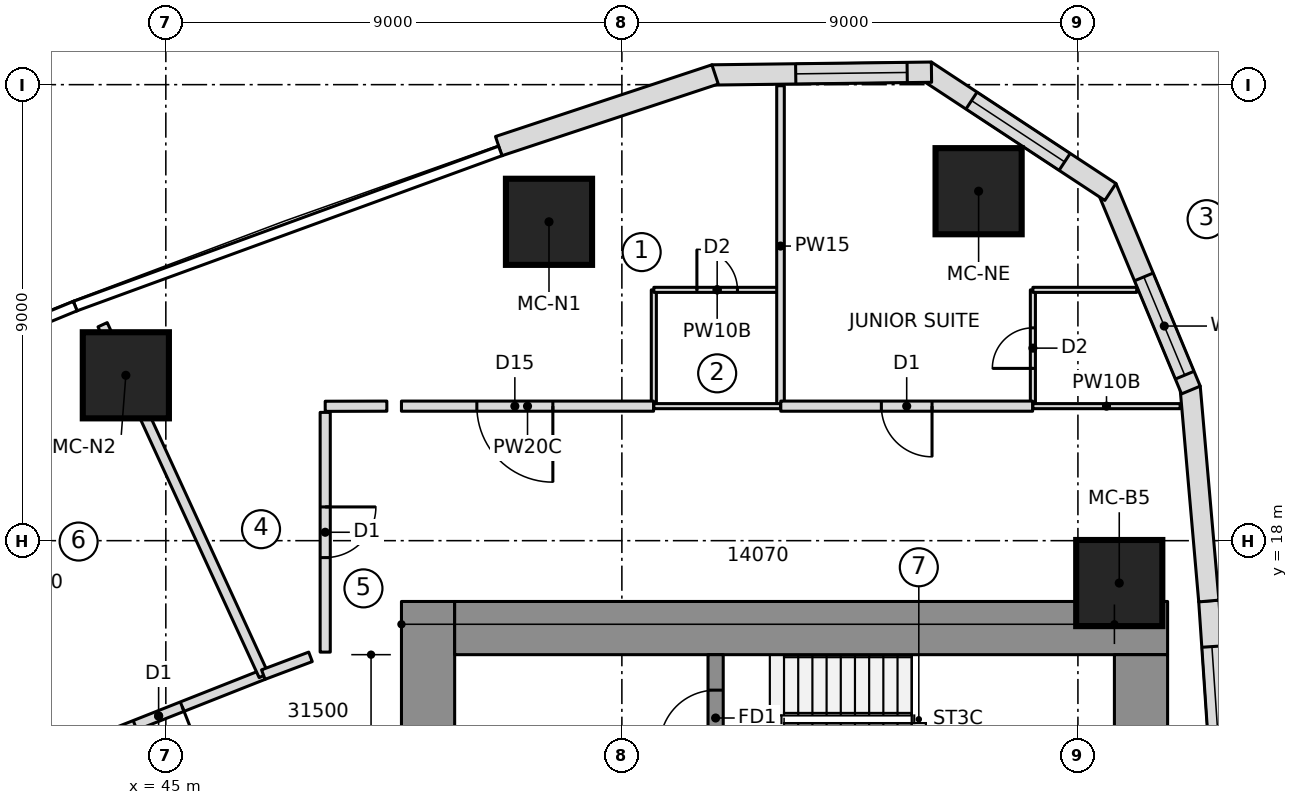
"""IFC4 building model, lengths in metres.
Left out: names, types, materials, properties, quantities, classifications, styles, units other than length and angle.
Written with IfcOpenShell. Run it as: python <this file> out.ifc"""

import sys

from ifc_helpers import new_model, si_unit, direction, frame, frame_2d, origin, origin_2d, place, context, subcontext, project, spatial, polyline, rectangle, outline, extrude, element, fill, save


model = new_model("IFC4")
c1 = context("Model", 3, precision=1e-05, world=origin(), true_north=direction((0.0, 1.0)))
c2 = subcontext(c1, "Body", "Model", "MODEL_VIEW")
j1 = project(units=[si_unit("LENGTHUNIT", "METRE"), si_unit("PLANEANGLEUNIT", "RADIAN")], contexts=[c1])
p1 = place(None, origin())
s1 = spatial("IfcSite", under=j1, at=p1, CompositionType="ELEMENT")
p2 = place(p1, origin())
s2 = spatial("IfcBuilding", under=s1, at=p2, CompositionType="ELEMENT")
p3 = place(p2, frame((0.0, 0.0, 88.45)))
s3 = spatial("IfcBuildingStorey", under=s2, at=p3, CompositionType="ELEMENT", Elevation=88.45)
p4 = place(p3, frame((50.175, 6.65, 0.0), z_axis=(0.0, 0.0, 1.0), x_axis=(0.0, 1.0, 0.0)))
e1 = element("IfcWall", 1, at=p4, inside=s3, PredefinedType="SHEAR", context=c2, shape_type="SweptSolid", body=[
    extrude(rectangle(XDim=10.15, YDim=1.05, at=frame_2d((5.075, 0.0))), origin(), (0.0, 0.0, 1.0), 3.55),
])
p5 = place(p4, frame((6.5, 0.0, 0.0)))
e2 = element("IfcOpeningElement", 2, at=p5, cuts=e1, PredefinedType="OPENING", context=c2, shape_type="SweptSolid", body=[
    extrude(rectangle(XDim=1.1, YDim=2.1, at=frame_2d((0.55, 1.05))), frame((0.0, 0.535, 0.0), z_axis=(0.0, -1.0, 0.0), x_axis=(1.0, 0.0, 0.0)), (0.0, 0.0, 1.0), 1.07),
])
p6 = place(p3, frame((50.7, 16.275, 0.0), z_axis=(0.0, 0.0, 1.0), x_axis=(1.0, 0.0, 0.0)))
e3 = element("IfcWall", 3, at=p6, inside=s3, PredefinedType="SHEAR", context=c2, shape_type="SweptSolid", body=[
    extrude(rectangle(XDim=14.07, YDim=1.05, at=frame_2d((7.035, 0.0))), origin(), (0.0, 0.0, 1.0), 3.55),
])
p7 = place(p3, frame((64.245, 9.389, 0.0), z_axis=(0.0, 0.0, 1.0), x_axis=(0.0, 1.0, 0.0)))
e4 = element("IfcWall", 4, at=p7, inside=s3, PredefinedType="SHEAR", context=c2, shape_type="SweptSolid", body=[
    extrude(rectangle(XDim=6.361, YDim=1.05, at=frame_2d((3.181, 0.0))), origin(), (0.0, 0.0, 1.0), 3.55),
])
p8 = place(p3, frame((55.85, 10.35, 0.0), z_axis=(0.0, 0.0, 1.0), x_axis=(0.0, 1.0, 0.0)))
e5 = element("IfcWall", 5, at=p8, inside=s3, PredefinedType="SHEAR", context=c2, shape_type="SweptSolid", body=[
    extrude(rectangle(XDim=5.4, YDim=0.3, at=frame_2d((2.7, 0.0))), origin(), (0.0, 0.0, 1.0), 3.55),
])
p9 = place(p8, frame((1.43, 0.0, 0.0)))
e6 = element("IfcOpeningElement", 6, at=p9, cuts=e5, PredefinedType="OPENING", context=c2, shape_type="SweptSolid", body=[
    extrude(rectangle(XDim=1.1, YDim=2.1, at=frame_2d((0.55, 1.05))), frame((0.0, 0.16, 0.0), z_axis=(0.0, -1.0, 0.0), x_axis=(1.0, 0.0, 0.0)), (0.0, 0.0, 1.0), 0.32),
])
p10 = place(p8, frame((3.6, 0.0, 0.0)))
e7 = element("IfcOpeningElement", 7, at=p10, cuts=e5, PredefinedType="OPENING", context=c2, shape_type="SweptSolid", body=[
    extrude(rectangle(XDim=1.1, YDim=2.1, at=frame_2d((0.55, 1.05))), frame((0.0, 0.16, 0.0), z_axis=(0.0, -1.0, 0.0), x_axis=(1.0, 0.0, 0.0)), (0.0, 0.0, 1.0), 0.32),
])
for number, where, z_axis, x_axis in (
    (8, (63.816, 17.164, 0.0), (0.0, 0.0, 1.0), (1.0, 0.0, 0.0)),
    (9, (61.04, 24.897, 0.0), (0.0, 0.0, 1.0), (1.0, 0.0, 0.0)),
    (10, (52.562, 24.293, 0.0), (0.0, 0.0, 1.0), (1.0, 0.0, 0.0)),
    (11, (44.211, 21.264, 0.0), (0.0, 0.0, 1.0), (1.0, 0.0, 0.0)),
):
    element("IfcColumn", number, at=place(p3, frame(where, z_axis=z_axis, x_axis=x_axis)), inside=s3, PredefinedType="COLUMN", context=c2, shape_type="SweptSolid", body=[
        extrude(rectangle(XDim=1.7, YDim=1.7, at=origin_2d()), origin(), (0.0, 0.0, 1.0), 3.55),
    ])
p11 = place(p3, frame((65.868, 12.614, 0.0), z_axis=(0.0, 0.0, 1.0), x_axis=(-0.067724559895, 0.997704056315, 0.0)))
e12 = element("IfcWall", 12, at=p11, inside=s3, PredefinedType="NOTDEFINED", context=c2, shape_type="SweptSolid", body=[
    extrude(outline(polyline([(-0.002, -0.2), (4.209, -0.2), (4.205, 0.2), (0.002, 0.2), (-0.002, -0.2)])), origin(), (0.0, 0.0, 1.0), 3.25),
])
p12 = place(p11, frame((0.903, 0.0, 0.5)))
e13 = element("IfcOpeningElement", 13, at=p12, cuts=e12, PredefinedType="OPENING", context=c2, shape_type="SweptSolid", body=[
    extrude(rectangle(XDim=2.4, YDim=2.0, at=frame_2d((1.2, 1.0))), frame((0.0, 0.21, 0.0), z_axis=(0.0, -1.0, 0.0), x_axis=(1.0, 0.0, 0.0)), (0.0, 0.0, 1.0), 0.42),
])
p13 = place(p3, frame((65.583, 16.811, 0.0), z_axis=(0.0, 0.0, 1.0), x_axis=(-0.086992730434, 0.996208946382, 0.0)))
e14 = element("IfcWall", 14, at=p13, inside=s3, PredefinedType="NOTDEFINED", context=c2, shape_type="SweptSolid", body=[
    extrude(outline(polyline([(-0.002, -0.2), (4.238, -0.2), (4.176, 0.2), (0.002, 0.2), (-0.002, -0.2)])), origin(), (0.0, 0.0, 1.0), 3.25),
])
p14 = place(p3, frame((65.217, 21.002, 0.0), z_axis=(0.0, 0.0, 1.0), x_axis=(-0.383997751971, 0.923334027577, 0.0)))
e15 = element("IfcWall", 15, at=p14, inside=s3, PredefinedType="NOTDEFINED", context=c2, shape_type="SweptSolid", body=[
    extrude(outline(polyline([(-0.031, -0.2), (4.3, -0.2), (4.177, 0.2), (0.031, 0.2), (-0.031, -0.2)])), origin(), (0.0, 0.0, 1.0), 3.25),
])
p15 = place(p14, frame((0.287, 0.0, 0.6)))
e16 = element("IfcOpeningElement", 16, at=p15, cuts=e15, PredefinedType="OPENING", context=c2, shape_type="SweptSolid", body=[
    extrude(outline(polyline([(0.0, 1.4), (0.08, 1.802), (0.308, 2.142), (0.648, 2.37), (1.05, 2.45), (1.452, 2.37), (1.792, 2.142), (2.02, 1.802), (2.1, 1.4), (2.1, 1.05), (2.02, 0.648), (1.792, 0.308), (1.452, 0.08), (1.05, 0.0), (0.648, 0.08), (0.308, 0.308), (0.08, 0.648), (0.0, 1.05), (0.0, 1.4)])), frame((0.0, 0.21, 0.0), z_axis=(0.0, -1.0, 0.0), x_axis=(1.0, 0.0, 0.0)), (0.0, 0.0, 1.0), 0.42),
])
p16 = place(p3, frame((63.59, 24.916, 0.0), z_axis=(0.0, 0.0, 1.0), x_axis=(-0.835340523653, 0.549732852887, 0.0)))
e17 = element("IfcWall", 17, at=p16, inside=s3, PredefinedType="NOTDEFINED", context=c2, shape_type="SweptSolid", body=[
    extrude(outline(polyline([(-0.061, -0.2), (4.3, -0.2), (4.178, 0.2), (0.061, 0.2), (-0.061, -0.2)])), origin(), (0.0, 0.0, 1.0), 3.25),
])
p17 = place(p16, frame((1.02, 0.0, 0.6)))
e18 = element("IfcOpeningElement", 18, at=p17, cuts=e17, PredefinedType="OPENING", context=c2, shape_type="SweptSolid", body=[
    extrude(outline(polyline([(0.0, 1.35), (0.084, 1.771), (0.322, 2.128), (0.679, 2.366), (1.1, 2.45), (1.521, 2.366), (1.878, 2.128), (2.116, 1.771), (2.2, 1.35), (2.2, 1.1), (2.116, 0.679), (1.878, 0.322), (1.521, 0.084), (1.1, 0.0), (0.679, 0.084), (0.322, 0.322), (0.084, 0.679), (0.0, 1.1), (0.0, 1.35)])), frame((0.0, 0.21, 0.0), z_axis=(0.0, -1.0, 0.0), x_axis=(1.0, 0.0, 0.0)), (0.0, 0.0, 1.0), 0.42),
])
p18 = place(p3, frame((60.049, 27.246, 0.0), z_axis=(0.0, 0.0, 1.0), x_axis=(-0.999919718849, -0.012671063772, 0.0)))
e19 = element("IfcWall", 19, at=p18, inside=s3, PredefinedType="NOTDEFINED", context=c2, shape_type="SweptSolid", body=[
    extrude(outline(polyline([(-0.061, -0.2), (4.27, -0.2), (4.208, 0.2), (0.061, 0.2), (-0.061, -0.2)])), origin(), (0.0, 0.0, 1.0), 3.25),
])
p19 = place(p18, frame((0.418, 0.0, 0.6)))
e20 = element("IfcOpeningElement", 20, at=p19, cuts=e19, PredefinedType="OPENING", context=c2, shape_type="SweptSolid", body=[
    extrude(outline(polyline([(0.0, 1.35), (0.084, 1.771), (0.322, 2.128), (0.679, 2.366), (1.1, 2.45), (1.521, 2.366), (1.878, 2.128), (2.116, 1.771), (2.2, 1.35), (2.2, 1.1), (2.116, 0.679), (1.878, 0.322), (1.521, 0.084), (1.1, 0.0), (0.679, 0.084), (0.322, 0.322), (0.084, 0.679), (0.0, 1.1), (0.0, 1.35)])), frame((0.0, 0.21, 0.0), z_axis=(0.0, -1.0, 0.0), x_axis=(1.0, 0.0, 0.0)), (0.0, 0.0, 1.0), 0.42),
])
p20 = place(p3, frame((55.81, 27.192, 0.0), z_axis=(0.0, 0.0, 1.0), x_axis=(-0.94925004851, -0.314522408429, 0.0)))
e21 = element("IfcWall", 21, at=p20, inside=s3, PredefinedType="NOTDEFINED", context=c2, shape_type="SweptSolid", body=[
    extrude(outline(polyline([(-0.031, -0.2), (4.468, -0.2), (4.468, 0.2), (0.031, 0.2), (-0.031, -0.2)])), origin(), (0.0, 0.0, 1.0), 3.25),
])
p21 = place(p3, frame((54.631, 20.65, 0.0), z_axis=(0.0, 0.0, 1.0), x_axis=(0.0, 1.0, 0.0)))
e22 = element("IfcWall", 22, at=p21, inside=s3, PredefinedType="PARTITIONING", context=c2, shape_type="SweptSolid", body=[
    extrude(rectangle(XDim=2.3, YDim=0.1, at=frame_2d((1.15, 0.0))), origin(), (0.0, 0.0, 1.0), 3.25),
])
p22 = place(p3, frame((54.631, 22.95, 0.0), z_axis=(0.0, 0.0, 1.0), x_axis=(1.0, 0.0, 0.0)))
e23 = element("IfcWall", 23, at=p22, inside=s3, PredefinedType="PARTITIONING", context=c2, shape_type="SweptSolid", body=[
    extrude(rectangle(XDim=2.5, YDim=0.1, at=frame_2d((1.25, 0.0))), origin(), (0.0, 0.0, 1.0), 3.25),
])
p23 = place(p22, frame((0.85, 0.0, 0.0)))
e24 = element("IfcOpeningElement", 24, at=p23, cuts=e23, PredefinedType="OPENING", context=c2, shape_type="SweptSolid", body=[
    extrude(rectangle(XDim=0.8, YDim=2.1, at=frame_2d((0.4, 1.05))), frame((0.0, 0.06, 0.0), z_axis=(0.0, -1.0, 0.0), x_axis=(1.0, 0.0, 0.0)), (0.0, 0.0, 1.0), 0.12),
])
p24 = place(p3, frame((62.111, 20.65, 0.0), z_axis=(0.0, 0.0, 1.0), x_axis=(0.0, 1.0, 0.0)))
e25 = element("IfcWall", 25, at=p24, inside=s3, PredefinedType="PARTITIONING", context=c2, shape_type="SweptSolid", body=[
    extrude(rectangle(XDim=2.3, YDim=0.1, at=frame_2d((1.15, 0.0))), origin(), (0.0, 0.0, 1.0), 3.25),
])
p25 = place(p24, frame((0.75, 0.0, 0.0)))
e26 = element("IfcOpeningElement", 26, at=p25, cuts=e25, PredefinedType="OPENING", context=c2, shape_type="SweptSolid", body=[
    extrude(rectangle(XDim=0.8, YDim=2.1, at=frame_2d((0.4, 1.05))), frame((0.0, 0.06, 0.0), z_axis=(0.0, -1.0, 0.0), x_axis=(1.0, 0.0, 0.0)), (0.0, 0.0, 1.0), 0.12),
])
p26 = place(p3, frame((62.111, 22.95, 0.0), z_axis=(0.0, 0.0, 1.0), x_axis=(1.0, 0.0, 0.0)))
e27 = element("IfcWall", 27, at=p26, inside=s3, PredefinedType="PARTITIONING", context=c2, shape_type="SweptSolid", body=[
    extrude(rectangle(XDim=2.049, YDim=0.1, at=frame_2d((1.025, 0.0))), origin(), (0.0, 0.0, 1.0), 3.25),
])
p27 = place(p3, frame((57.131, 20.65, 0.0), z_axis=(0.0, 0.0, 1.0), x_axis=(0.0, 1.0, 0.0)))
e28 = element("IfcWall", 28, at=p27, inside=s3, PredefinedType="PARTITIONING", context=c2, shape_type="SweptSolid", body=[
    extrude(rectangle(XDim=6.329, YDim=0.15, at=frame_2d((3.165, 0.0))), origin(), (0.0, 0.0, 1.0), 3.25),
])
p28 = place(p3, frame((42.799, 13.705, 0.0), z_axis=(0.0, 0.0, 1.0), x_axis=(-0.417427858403, 0.908710065438, 0.0)))
e29 = element("IfcWall", 29, at=p28, inside=s3, PredefinedType="PARTITIONING", context=c2, shape_type="SweptSolid", body=[
    extrude(rectangle(XDim=7.61, YDim=0.2, at=frame_2d((3.805, 0.0))), origin(), (0.0, 0.0, 1.0), 3.25),
])
p29 = place(p3, frame((46.924, 15.357, 0.0), z_axis=(0.0, 0.0, 1.0), x_axis=(-0.930040633249, -0.367456692014, 0.0)))
e30 = element("IfcWall", 30, at=p29, inside=s3, PredefinedType="PARTITIONING", context=c2, shape_type="SweptSolid", body=[
    extrude(rectangle(XDim=4.444, YDim=0.2, at=frame_2d((2.222, 0.0))), origin(), (0.0, 0.0, 1.0), 3.25),
])
p30 = place(p29, frame((1.722, 0.0, 0.0)))
e31 = element("IfcOpeningElement", 31, at=p30, cuts=e30, PredefinedType="OPENING", context=c2, shape_type="SweptSolid", body=[
    extrude(rectangle(XDim=1.0, YDim=2.1, at=frame_2d((0.5, 1.05))), frame((0.0, 0.11, 0.0), z_axis=(0.0, -1.0, 0.0), x_axis=(1.0, 0.0, 0.0)), (0.0, 0.0, 1.0), 0.22),
])
p31 = place(p3, frame((46.933, 15.339, 0.0), z_axis=(0.0, 0.0, 1.0), x_axis=(-0.417437957167, 0.908705426371, 0.0)))
e32 = element("IfcWall", 32, at=p31, inside=s3, PredefinedType="PARTITIONING", context=c2, shape_type="SweptSolid", body=[
    extrude(rectangle(XDim=7.619, YDim=0.2, at=frame_2d((3.81, 0.0))), origin(), (0.0, 0.0, 1.0), 3.25),
])
p32 = place(p3, frame((54.625, 20.655, 0.0), z_axis=(0.0, 0.0, 1.0), x_axis=(-1.0, 0.0, 0.0)))
e33 = element("IfcWall", 33, at=p32, inside=s3, PredefinedType="PARTITIONING", context=c2, shape_type="SweptSolid", body=[
    extrude(rectangle(XDim=4.976, YDim=0.2, at=frame_2d((2.488, 0.0))), origin(), (0.0, 0.0, 1.0), 3.25),
])
p33 = place(p32, frame((1.988, 0.0, 0.0)))
e34 = element("IfcOpeningElement", 34, at=p33, cuts=e33, PredefinedType="OPENING", context=c2, shape_type="SweptSolid", body=[
    extrude(rectangle(XDim=1.5, YDim=2.1, at=frame_2d((0.75, 1.05))), frame((0.0, 0.11, 0.0), z_axis=(0.0, -1.0, 0.0), x_axis=(1.0, 0.0, 0.0)), (0.0, 0.0, 1.0), 0.22),
])
p34 = place(p3, frame((62.106, 20.655, 0.0), z_axis=(0.0, 0.0, 1.0), x_axis=(-1.0, 0.0, 0.0)))
e35 = element("IfcWall", 35, at=p34, inside=s3, PredefinedType="PARTITIONING", context=c2, shape_type="SweptSolid", body=[
    extrude(rectangle(XDim=4.971, YDim=0.2, at=frame_2d((2.485, 0.0))), origin(), (0.0, 0.0, 1.0), 3.25),
])
p35 = place(p34, frame((1.985, 0.0, 0.0)))
e36 = element("IfcOpeningElement", 36, at=p35, cuts=e35, PredefinedType="OPENING", context=c2, shape_type="SweptSolid", body=[
    extrude(rectangle(XDim=1.0, YDim=2.1, at=frame_2d((0.5, 1.05))), frame((0.0, 0.11, 0.0), z_axis=(0.0, -1.0, 0.0), x_axis=(1.0, 0.0, 0.0)), (0.0, 0.0, 1.0), 0.22),
])
p36 = place(p3, frame((57.131, 20.655, 0.0), z_axis=(0.0, 0.0, 1.0), x_axis=(-1.0, 0.0, 0.0)))
e37 = element("IfcWall", 37, at=p36, inside=s3, PredefinedType="PARTITIONING", context=c2, shape_type="SweptSolid", body=[
    extrude(rectangle(XDim=2.5, YDim=0.1, at=frame_2d((1.25, 0.0))), origin(), (0.0, 0.0, 1.0), 3.25),
])
p37 = place(p3, frame((65.017, 20.655, 0.0), z_axis=(0.0, 0.0, 1.0), x_axis=(-1.0, 0.0, 0.0)))
e38 = element("IfcWall", 38, at=p37, inside=s3, PredefinedType="PARTITIONING", context=c2, shape_type="SweptSolid", body=[
    extrude(rectangle(XDim=2.906, YDim=0.1, at=frame_2d((1.453, 0.0))), origin(), (0.0, 0.0, 1.0), 3.25),
])
p38 = place(p3, frame((47.855, 15.707, 0.0), z_axis=(0.0, 0.0, 1.0), x_axis=(-0.935803526171, -0.35252199989, 0.0)))
e39 = element("IfcWall", 39, at=p38, inside=s3, PredefinedType="PARTITIONING", context=c2, shape_type="SweptSolid", body=[
    extrude(rectangle(XDim=0.995, YDim=0.2, at=frame_2d((0.497, 0.0))), origin(), (0.0, 0.0, 1.0), 3.25),
])
p39 = place(p3, frame((49.362, 20.655, 0.0), z_axis=(0.0, 0.0, 1.0), x_axis=(-0.999996595549, -0.002609384934, 0.0)))
e40 = element("IfcWall", 40, at=p39, inside=s3, PredefinedType="PARTITIONING", context=c2, shape_type="SweptSolid", body=[
    extrude(rectangle(XDim=1.216, YDim=0.2, at=frame_2d((0.608, 0.0))), origin(), (0.0, 0.0, 1.0), 3.25),
])
p40 = place(p3, frame((48.146, 20.532, 0.0), z_axis=(0.0, 0.0, 1.0), x_axis=(-5.1599587e-05, -0.999999998669, 0.0)))
e41 = element("IfcWall", 41, at=p40, inside=s3, PredefinedType="PARTITIONING", context=c2, shape_type="SweptSolid", body=[
    extrude(rectangle(XDim=4.731, YDim=0.2, at=frame_2d((2.366, 0.0))), origin(), (0.0, 0.0, 1.0), 3.25),
])
p41 = place(p40, frame((1.866, 0.0, 0.0)))
e42 = element("IfcOpeningElement", 42, at=p41, cuts=e41, PredefinedType="OPENING", context=c2, shape_type="SweptSolid", body=[
    extrude(rectangle(XDim=1.0, YDim=2.1, at=frame_2d((0.5, 1.05))), frame((0.0, 0.11, 0.0), z_axis=(0.0, -1.0, 0.0), x_axis=(1.0, 0.0, 0.0)), (0.0, 0.0, 1.0), 0.22),
])
p42 = place(p12, origin())
e43 = element("IfcWindow", 43, at=p42, inside=s3, PartitioningType="SINGLE_PANEL", PredefinedType="WINDOW", context=c2, shape_type="SweptSolid", body=[
    extrude(rectangle(XDim=2.4, YDim=2.0, at=frame_2d((1.2, 1.0))), frame((0.0, 0.17, 0.0), z_axis=(0.0, -1.0, 0.0), x_axis=(1.0, 0.0, 0.0)), (0.0, 0.0, 1.0), 0.06),
])
fill(e13, e43)
p43 = place(p15, origin())
e44 = element("IfcWindow", 44, at=p43, inside=s3, PartitioningType="SINGLE_PANEL", PredefinedType="WINDOW", context=c2, shape_type="SweptSolid", body=[
    extrude(outline(polyline([(0.0, 1.4), (0.08, 1.802), (0.308, 2.142), (0.648, 2.37), (1.05, 2.45), (1.452, 2.37), (1.792, 2.142), (2.02, 1.802), (2.1, 1.4), (2.1, 1.05), (2.02, 0.648), (1.792, 0.308), (1.452, 0.08), (1.05, 0.0), (0.648, 0.08), (0.308, 0.308), (0.08, 0.648), (0.0, 1.05), (0.0, 1.4)])), frame((0.0, 0.17, 0.0), z_axis=(0.0, -1.0, 0.0), x_axis=(1.0, 0.0, 0.0)), (0.0, 0.0, 1.0), 0.06),
])
fill(e16, e44)
p44 = place(p17, origin())
e45 = element("IfcWindow", 45, at=p44, inside=s3, PartitioningType="SINGLE_PANEL", PredefinedType="WINDOW", context=c2, shape_type="SweptSolid", body=[
    extrude(outline(polyline([(0.0, 1.35), (0.084, 1.771), (0.322, 2.128), (0.679, 2.366), (1.1, 2.45), (1.521, 2.366), (1.878, 2.128), (2.116, 1.771), (2.2, 1.35), (2.2, 1.1), (2.116, 0.679), (1.878, 0.322), (1.521, 0.084), (1.1, 0.0), (0.679, 0.084), (0.322, 0.322), (0.084, 0.679), (0.0, 1.1), (0.0, 1.35)])), frame((0.0, 0.17, 0.0), z_axis=(0.0, -1.0, 0.0), x_axis=(1.0, 0.0, 0.0)), (0.0, 0.0, 1.0), 0.06),
])
fill(e18, e45)
p45 = place(p19, origin())
e46 = element("IfcWindow", 46, at=p45, inside=s3, PartitioningType="SINGLE_PANEL", PredefinedType="WINDOW", context=c2, shape_type="SweptSolid", body=[
    extrude(outline(polyline([(0.0, 1.35), (0.084, 1.771), (0.322, 2.128), (0.679, 2.366), (1.1, 2.45), (1.521, 2.366), (1.878, 2.128), (2.116, 1.771), (2.2, 1.35), (2.2, 1.1), (2.116, 0.679), (1.878, 0.322), (1.521, 0.084), (1.1, 0.0), (0.679, 0.084), (0.322, 0.322), (0.084, 0.679), (0.0, 1.1), (0.0, 1.35)])), frame((0.0, 0.17, 0.0), z_axis=(0.0, -1.0, 0.0), x_axis=(1.0, 0.0, 0.0)), (0.0, 0.0, 1.0), 0.06),
])
fill(e20, e46)
p46 = place(p23, origin())
e47 = element("IfcDoor", 47, at=p46, inside=s3, OperationType="SINGLE_SWING_LEFT", PredefinedType="DOOR", context=c2, shape_type="SweptSolid", body=[
    extrude(rectangle(XDim=0.8, YDim=2.1, at=frame_2d((0.4, 1.05))), frame((0.0, 0.025, 0.0), z_axis=(0.0, -1.0, 0.0), x_axis=(1.0, 0.0, 0.0)), (0.0, 0.0, 1.0), 0.05),
])
fill(e24, e47)
p47 = place(p25, origin())
e48 = element("IfcDoor", 48, at=p47, inside=s3, OperationType="SINGLE_SWING_LEFT", PredefinedType="DOOR", context=c2, shape_type="SweptSolid", body=[
    extrude(rectangle(XDim=0.8, YDim=2.1, at=frame_2d((0.4, 1.05))), frame((0.0, 0.025, 0.0), z_axis=(0.0, -1.0, 0.0), x_axis=(1.0, 0.0, 0.0)), (0.0, 0.0, 1.0), 0.05),
])
fill(e26, e48)
p48 = place(p30, origin())
e49 = element("IfcDoor", 49, at=p48, inside=s3, OperationType="SINGLE_SWING_LEFT", PredefinedType="DOOR", context=c2, shape_type="SweptSolid", body=[
    extrude(rectangle(XDim=1.0, YDim=2.1, at=frame_2d((0.5, 1.05))), frame((0.0, 0.025, 0.0), z_axis=(0.0, -1.0, 0.0), x_axis=(1.0, 0.0, 0.0)), (0.0, 0.0, 1.0), 0.05),
])
fill(e31, e49)
p49 = place(p33, origin())
e50 = element("IfcDoor", 50, at=p49, inside=s3, OperationType="DOUBLE_DOOR_SINGLE_SWING", PredefinedType="DOOR", context=c2, shape_type="SweptSolid", body=[
    extrude(rectangle(XDim=1.5, YDim=2.1, at=frame_2d((0.75, 1.05))), frame((0.0, 0.025, 0.0), z_axis=(0.0, -1.0, 0.0), x_axis=(1.0, 0.0, 0.0)), (0.0, 0.0, 1.0), 0.05),
])
fill(e34, e50)
p50 = place(p35, origin())
e51 = element("IfcDoor", 51, at=p50, inside=s3, OperationType="SINGLE_SWING_LEFT", PredefinedType="DOOR", context=c2, shape_type="SweptSolid", body=[
    extrude(rectangle(XDim=1.0, YDim=2.1, at=frame_2d((0.5, 1.05))), frame((0.0, 0.025, 0.0), z_axis=(0.0, -1.0, 0.0), x_axis=(1.0, 0.0, 0.0)), (0.0, 0.0, 1.0), 0.05),
])
fill(e36, e51)
p51 = place(p41, origin())
e52 = element("IfcDoor", 52, at=p51, inside=s3, OperationType="SINGLE_SWING_LEFT", PredefinedType="DOOR", context=c2, shape_type="SweptSolid", body=[
    extrude(rectangle(XDim=1.0, YDim=2.1, at=frame_2d((0.5, 1.05))), frame((0.0, 0.025, 0.0), z_axis=(0.0, -1.0, 0.0), x_axis=(1.0, 0.0, 0.0)), (0.0, 0.0, 1.0), 0.05),
])
fill(e42, e52)
p52 = place(p10, origin())
e53 = element("IfcDoor", 53, at=p52, inside=s3, OperationType="SINGLE_SWING_RIGHT", PredefinedType="DOOR", context=c2, shape_type="SweptSolid", body=[
    extrude(rectangle(XDim=1.1, YDim=2.1, at=frame_2d((0.55, 1.05))), frame((0.0, 0.025, 0.0), z_axis=(0.0, -1.0, 0.0), x_axis=(1.0, 0.0, 0.0)), (0.0, 0.0, 1.0), 0.05),
])
fill(e7, e53)
save(model, sys.argv[1])
